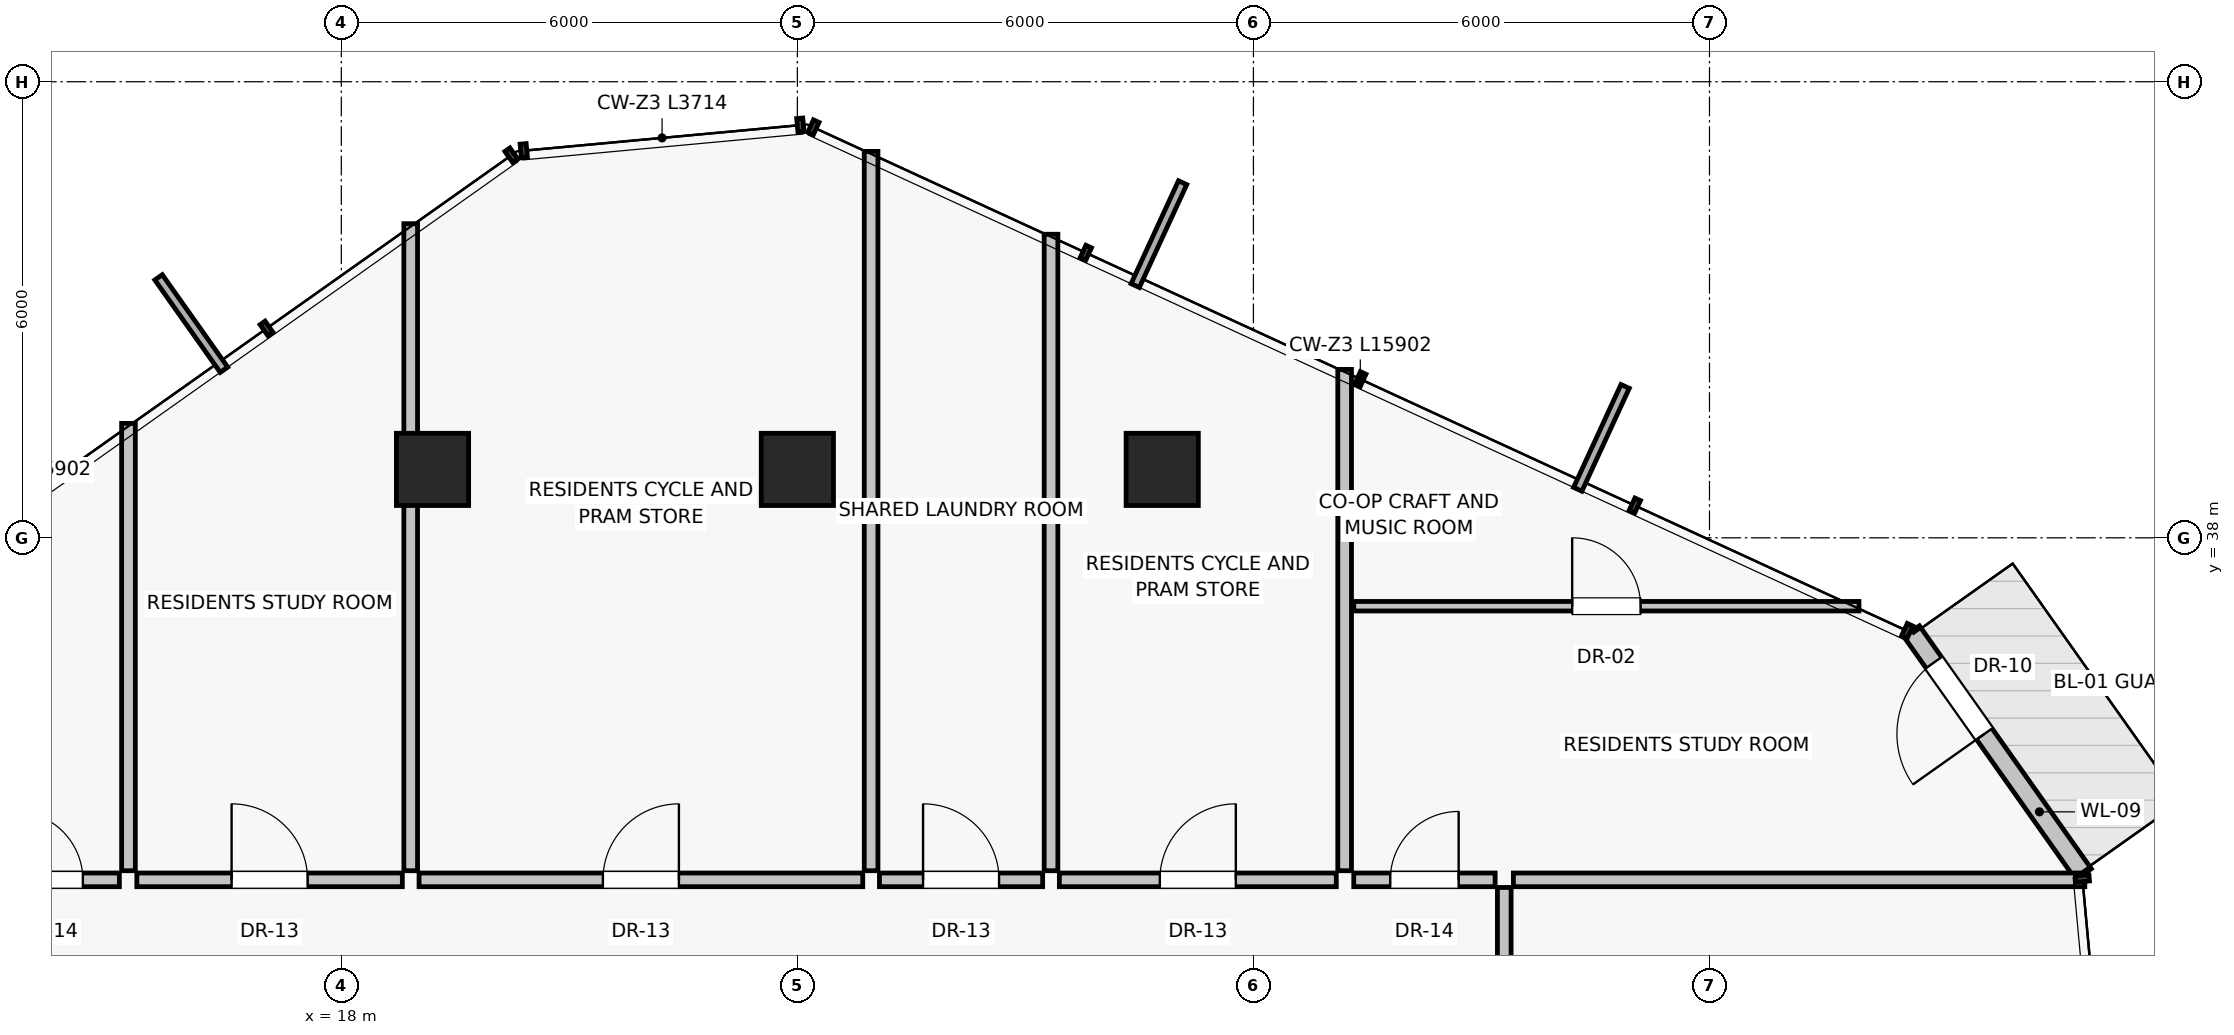
"""IFC4 building model, lengths in metres.
Left out: names, types, materials, properties, quantities, classifications, styles, units other than length and angle.
Written with IfcOpenShell. Run it as: python <this file> out.ifc"""

import sys

from ifc_helpers import new_model, si_unit, direction, frame, frame_2d, origin, origin_2d, place, context, subcontext, project, spatial, rectangle, extrude, source, transform, mapped, element, fill, save


model = new_model("IFC4")
c1 = context("Model", 3, precision=1e-05, world=origin(), true_north=direction((0.0, 1.0)))
c2 = subcontext(c1, "Body", "Model", "MODEL_VIEW")
j1 = project(units=[si_unit("LENGTHUNIT", "METRE"), si_unit("PLANEANGLEUNIT", "RADIAN")], contexts=[c1])
p1 = place(None, origin())
s1 = spatial("IfcSite", under=j1, at=p1, CompositionType="ELEMENT")
p2 = place(p1, origin())
s2 = spatial("IfcBuilding", under=s1, at=p2, CompositionType="ELEMENT")
p3 = place(p2, frame((0.0, 0.0, 188.6)))
s3 = spatial("IfcBuildingStorey", under=s2, at=p3, CompositionType="ELEMENT", Elevation=188.6)
for number, where, z_axis, x_axis in (
    (1, (28.8, 38.9, 0.0), (0.0, 0.0, 1.0), (1.0, 0.0, 0.0)),
    (2, (24.0, 38.9, 0.0), (0.0, 0.0, 1.0), (1.0, 0.0, 0.0)),
    (3, (19.2, 38.9, 0.0), (0.0, 0.0, 1.0), (1.0, 0.0, 0.0)),
):
    element("IfcColumn", number, at=place(p3, frame(where, z_axis=z_axis, x_axis=x_axis)), inside=s3, PredefinedType="COLUMN", context=c2, shape_type="SweptSolid", body=[
        extrude(rectangle(XDim=0.95, YDim=0.95, at=origin_2d()), origin(), (0.0, 0.0, 1.0), 3.25),
    ])
p4 = place(p3, frame((40.921, 33.574, 0.0), z_axis=(0.0, 0.0, 1.0), x_axis=(-0.577544819333, 0.816358978429, 0.0)))
e4 = element("IfcWall", 4, at=p4, inside=s3, PredefinedType="SOLIDWALL", context=c2, shape_type="SweptSolid", body=[
    extrude(rectangle(XDim=3.914, YDim=0.25, at=frame_2d((1.957, 0.0))), origin(), (0.0, 0.0, 1.0), 3.015),
])
p5 = place(p4, frame((2.26, 0.0, 0.0)))
e5 = element("IfcOpeningElement", 5, at=p5, cuts=e4, PredefinedType="OPENING", context=c2, shape_type="SweptSolid", body=[
    extrude(rectangle(XDim=1.15, YDim=2.25, at=frame_2d((0.575, 1.125))), frame((0.0, 0.135, 0.0), z_axis=(0.0, -1.0, 0.0), x_axis=(1.0, 0.0, 0.0)), (0.0, 0.0, 1.0), 0.27),
])
p6 = place(p3, frame((15.2, 33.62, 0.0), z_axis=(0.0, 0.0, 1.0), x_axis=(0.0, 1.0, 0.0)))
e6 = element("IfcWall", 6, at=p6, inside=s3, PredefinedType="PARTITIONING", context=c2, shape_type="SweptSolid", body=[
    extrude(rectangle(XDim=5.885, YDim=0.18, at=frame_2d((2.943, 0.0))), origin(), (0.0, 0.0, 1.0), 3.015),
])
p7 = place(p3, frame((31.2, 33.62, 0.0), z_axis=(0.0, 0.0, 1.0), x_axis=(0.0, 1.0, 0.0)))
e7 = element("IfcWall", 7, at=p7, inside=s3, PredefinedType="PARTITIONING", context=c2, shape_type="SweptSolid", body=[
    extrude(rectangle(XDim=6.595, YDim=0.18, at=frame_2d((3.297, 0.0))), origin(), (0.0, 0.0, 1.0), 3.015),
])
p8 = place(p3, frame((15.31, 33.5, 0.0), z_axis=(0.0, 0.0, 1.0), x_axis=(1.0, 0.0, 0.0)))
e8 = element("IfcWall", 8, at=p8, inside=s3, PredefinedType="PARTITIONING", context=c2, shape_type="SweptSolid", body=[
    extrude(rectangle(XDim=3.493, YDim=0.18, at=frame_2d((1.747, 0.0))), origin(), (0.0, 0.0, 1.0), 3.015),
])
p9 = place(p8, frame((1.247, 0.0, 0.0)))
e9 = element("IfcOpeningElement", 9, at=p9, cuts=e8, PredefinedType="OPENING", context=c2, shape_type="SweptSolid", body=[
    extrude(rectangle(XDim=1.0, YDim=2.01, at=frame_2d((0.5, 1.005))), frame((0.0, 0.1, 0.0), z_axis=(0.0, -1.0, 0.0), x_axis=(1.0, 0.0, 0.0)), (0.0, 0.0, 1.0), 0.2),
])
p10 = place(p3, frame((19.023, 33.5, 0.0), z_axis=(0.0, 0.0, 1.0), x_axis=(1.0, 0.0, 0.0)))
e10 = element("IfcWall", 10, at=p10, inside=s3, PredefinedType="PARTITIONING", context=c2, shape_type="SweptSolid", body=[
    extrude(rectangle(XDim=5.837, YDim=0.18, at=frame_2d((2.918, 0.0))), origin(), (0.0, 0.0, 1.0), 3.015),
])
p11 = place(p10, frame((2.418, 0.0, 0.0)))
e11 = element("IfcOpeningElement", 11, at=p11, cuts=e10, PredefinedType="OPENING", context=c2, shape_type="SweptSolid", body=[
    extrude(rectangle(XDim=1.0, YDim=2.01, at=frame_2d((0.5, 1.005))), frame((0.0, 0.1, 0.0), z_axis=(0.0, -1.0, 0.0), x_axis=(1.0, 0.0, 0.0)), (0.0, 0.0, 1.0), 0.2),
])
p12 = place(p3, frame((18.913, 33.62, 0.0), z_axis=(0.0, 0.0, 1.0), x_axis=(0.0, 1.0, 0.0)))
e12 = element("IfcWall", 12, at=p12, inside=s3, PredefinedType="PARTITIONING", context=c2, shape_type="SweptSolid", body=[
    extrude(rectangle(XDim=8.512, YDim=0.18, at=frame_2d((4.256, 0.0))), origin(), (0.0, 0.0, 1.0), 2.469),
])
p13 = place(p3, frame((24.97, 33.62, 0.0), z_axis=(0.0, 0.0, 1.0), x_axis=(0.0, 1.0, 0.0)))
e13 = element("IfcWall", 13, at=p13, inside=s3, PredefinedType="PARTITIONING", context=c2, shape_type="SweptSolid", body=[
    extrude(rectangle(XDim=9.463, YDim=0.18, at=frame_2d((4.732, 0.0))), origin(), (0.0, 0.0, 1.0), 3.015),
])
p14 = place(p3, frame((25.08, 33.5, 0.0), z_axis=(0.0, 0.0, 1.0), x_axis=(1.0, 0.0, 0.0)))
e14 = element("IfcWall", 14, at=p14, inside=s3, PredefinedType="PARTITIONING", context=c2, shape_type="SweptSolid", body=[
    extrude(rectangle(XDim=2.147, YDim=0.18, at=frame_2d((1.073, 0.0))), origin(), (0.0, 0.0, 1.0), 3.015),
])
p15 = place(p14, frame((0.573, 0.0, 0.0)))
e15 = element("IfcOpeningElement", 15, at=p15, cuts=e14, PredefinedType="OPENING", context=c2, shape_type="SweptSolid", body=[
    extrude(rectangle(XDim=1.0, YDim=2.01, at=frame_2d((0.5, 1.005))), frame((0.0, 0.1, 0.0), z_axis=(0.0, -1.0, 0.0), x_axis=(1.0, 0.0, 0.0)), (0.0, 0.0, 1.0), 0.2),
])
p16 = place(p3, frame((27.447, 33.5, 0.0), z_axis=(0.0, 0.0, 1.0), x_axis=(1.0, 0.0, 0.0)))
e16 = element("IfcWall", 16, at=p16, inside=s3, PredefinedType="PARTITIONING", context=c2, shape_type="SweptSolid", body=[
    extrude(rectangle(XDim=3.643, YDim=0.18, at=frame_2d((1.822, 0.0))), origin(), (0.0, 0.0, 1.0), 3.015),
])
p17 = place(p16, frame((1.322, 0.0, 0.0)))
e17 = element("IfcOpeningElement", 17, at=p17, cuts=e16, PredefinedType="OPENING", context=c2, shape_type="SweptSolid", body=[
    extrude(rectangle(XDim=1.0, YDim=2.01, at=frame_2d((0.5, 1.005))), frame((0.0, 0.1, 0.0), z_axis=(0.0, -1.0, 0.0), x_axis=(1.0, 0.0, 0.0)), (0.0, 0.0, 1.0), 0.2),
])
p18 = place(p3, frame((27.337, 33.62, 0.0), z_axis=(0.0, 0.0, 1.0), x_axis=(0.0, 1.0, 0.0)))
e18 = element("IfcWall", 18, at=p18, inside=s3, PredefinedType="PARTITIONING", context=c2, shape_type="SweptSolid", body=[
    extrude(rectangle(XDim=8.374, YDim=0.18, at=frame_2d((4.187, 0.0))), origin(), (0.0, 0.0, 1.0), 3.015),
])
p19 = place(p3, frame((33.3, 31.5, 0.0), z_axis=(0.0, 0.0, 1.0), x_axis=(0.0, 1.0, 0.0)))
e19 = element("IfcWall", 19, at=p19, inside=s3, PredefinedType="PARTITIONING", context=c2, shape_type="SweptSolid", body=[
    extrude(rectangle(XDim=1.9, YDim=0.18, at=frame_2d((0.95, 0.0))), origin(), (0.0, 0.0, 1.0), 3.015),
])
p20 = place(p3, frame((13.22, 33.5, 0.0), z_axis=(0.0, 0.0, 1.0), x_axis=(1.0, 0.0, 0.0)))
e20 = element("IfcWall", 20, at=p20, inside=s3, PredefinedType="PARTITIONING", context=c2, shape_type="SweptSolid", body=[
    extrude(rectangle(XDim=1.86, YDim=0.18, at=frame_2d((0.93, 0.0))), origin(), (0.0, 0.0, 1.0), 3.015),
])
p21 = place(p20, frame((0.48, 0.0, 0.0)))
e21 = element("IfcOpeningElement", 21, at=p21, cuts=e20, PredefinedType="OPENING", context=c2, shape_type="SweptSolid", body=[
    extrude(rectangle(XDim=0.9, YDim=2.01, at=frame_2d((0.45, 1.005))), frame((0.0, 0.1, 0.0), z_axis=(0.0, -1.0, 0.0), x_axis=(1.0, 0.0, 0.0)), (0.0, 0.0, 1.0), 0.2),
])
p22 = place(p3, frame((33.42, 33.5, 0.0), z_axis=(0.0, 0.0, 1.0), x_axis=(1.0, 0.0, 0.0)))
e22 = element("IfcWall", 22, at=p22, inside=s3, PredefinedType="PARTITIONING", context=c2, shape_type="SweptSolid", body=[
    extrude(rectangle(XDim=7.518, YDim=0.18, at=frame_2d((3.759, 0.0))), origin(), (0.0, 0.0, 1.0), 3.015),
])
p23 = place(p3, frame((31.32, 33.5, 0.0), z_axis=(0.0, 0.0, 1.0), x_axis=(1.0, 0.0, 0.0)))
e23 = element("IfcWall", 23, at=p23, inside=s3, PredefinedType="PARTITIONING", context=c2, shape_type="SweptSolid", body=[
    extrude(rectangle(XDim=1.86, YDim=0.18, at=frame_2d((0.93, 0.0))), origin(), (0.0, 0.0, 1.0), 3.015),
])
p24 = place(p23, frame((0.48, 0.0, 0.0)))
e24 = element("IfcOpeningElement", 24, at=p24, cuts=e23, PredefinedType="OPENING", context=c2, shape_type="SweptSolid", body=[
    extrude(rectangle(XDim=0.9, YDim=2.01, at=frame_2d((0.45, 1.005))), frame((0.0, 0.1, 0.0), z_axis=(0.0, -1.0, 0.0), x_axis=(1.0, 0.0, 0.0)), (0.0, 0.0, 1.0), 0.2),
])
p25 = place(p3, frame((31.32, 37.1, 0.0), z_axis=(0.0, 0.0, 1.0), x_axis=(1.0, 0.0, 0.0)))
e25 = element("IfcWall", 25, at=p25, inside=s3, PredefinedType="PARTITIONING", context=c2, shape_type="SweptSolid", body=[
    extrude(rectangle(XDim=6.647, YDim=0.125, at=frame_2d((3.323, 0.0))), origin(), (0.0, 0.0, 1.0), 3.015),
])
p26 = place(p25, frame((2.873, 0.0, 0.0)))
e26 = element("IfcOpeningElement", 26, at=p26, cuts=e25, PredefinedType="OPENING", context=c2, shape_type="SweptSolid", body=[
    extrude(rectangle(XDim=0.9, YDim=2.01, at=frame_2d((0.45, 1.005))), frame((0.0, 0.073, 0.0), z_axis=(0.0, -1.0, 0.0), x_axis=(1.0, 0.0, 0.0)), (0.0, 0.0, 1.0), 0.145),
])
m1 = source(origin(), c2, "Body", "SweptSolid", [
    extrude(rectangle(XDim=1.15, YDim=2.25, at=frame_2d((0.575, 1.125))), frame((0.0, 0.025, 0.0), z_axis=(0.0, -1.0, 0.0), x_axis=(1.0, 0.0, 0.0)), (0.0, 0.0, 1.0), 0.05),
])
p27 = place(p5, frame((1.15, 0.0, 0.0), z_axis=(0.0, 0.0, 1.0), x_axis=(-1.0, 0.0, 0.0)))
e27 = element("IfcDoor", 27, at=p27, inside=s3, OperationType="SINGLE_SWING_LEFT", PredefinedType="DOOR", context=c2, shape_type="MappedRepresentation", body=[
    mapped(m1, transform((0.0, 0.0, 0.0), scale=1.0)),
])
fill(e5, e27)
m2 = source(origin(), c2, "Body", "SweptSolid", [
    extrude(rectangle(XDim=1.0, YDim=2.01, at=frame_2d((0.5, 1.005))), frame((0.0, 0.025, 0.0), z_axis=(0.0, -1.0, 0.0), x_axis=(1.0, 0.0, 0.0)), (0.0, 0.0, 1.0), 0.05),
])
p28 = place(p9, origin())
e28 = element("IfcDoor", 28, at=p28, inside=s3, OperationType="SINGLE_SWING_LEFT", PredefinedType="DOOR", context=c2, shape_type="MappedRepresentation", body=[
    mapped(m2, transform((0.0, 0.0, 0.0), scale=1.0)),
])
fill(e9, e28)
p29 = place(p11, origin())
e29 = element("IfcDoor", 29, at=p29, inside=s3, OperationType="SINGLE_SWING_RIGHT", PredefinedType="DOOR", context=c2, shape_type="MappedRepresentation", body=[
    mapped(m2, transform((0.0, 0.0, 0.0), scale=1.0)),
])
fill(e11, e29)
p30 = place(p15, origin())
e30 = element("IfcDoor", 30, at=p30, inside=s3, OperationType="SINGLE_SWING_LEFT", PredefinedType="DOOR", context=c2, shape_type="MappedRepresentation", body=[
    mapped(m2, transform((0.0, 0.0, 0.0), scale=1.0)),
])
fill(e15, e30)
p31 = place(p17, origin())
e31 = element("IfcDoor", 31, at=p31, inside=s3, OperationType="SINGLE_SWING_RIGHT", PredefinedType="DOOR", context=c2, shape_type="MappedRepresentation", body=[
    mapped(m2, transform((0.0, 0.0, 0.0), scale=1.0)),
])
fill(e17, e31)
m3 = source(origin(), c2, "Body", "SweptSolid", [
    extrude(rectangle(XDim=0.9, YDim=2.01, at=frame_2d((0.45, 1.005))), frame((0.0, 0.025, 0.0), z_axis=(0.0, -1.0, 0.0), x_axis=(1.0, 0.0, 0.0)), (0.0, 0.0, 1.0), 0.05),
])
p32 = place(p21, origin())
e32 = element("IfcDoor", 32, at=p32, inside=s3, OperationType="SINGLE_SWING_LEFT", PredefinedType="DOOR", context=c2, shape_type="MappedRepresentation", body=[
    mapped(m3, transform((0.0, 0.0, 0.0), scale=1.0)),
])
fill(e21, e32)
p33 = place(p24, origin())
e33 = element("IfcDoor", 33, at=p33, inside=s3, OperationType="SINGLE_SWING_RIGHT", PredefinedType="DOOR", context=c2, shape_type="MappedRepresentation", body=[
    mapped(m3, transform((0.0, 0.0, 0.0), scale=1.0)),
])
fill(e24, e33)
p34 = place(p26, origin())
e34 = element("IfcDoor", 34, at=p34, inside=s3, OperationType="SINGLE_SWING_LEFT", PredefinedType="DOOR", context=c2, shape_type="MappedRepresentation", body=[
    mapped(m3, transform((0.0, 0.0, 0.0), scale=1.0)),
])
fill(e26, e34)
save(model, sys.argv[1])
